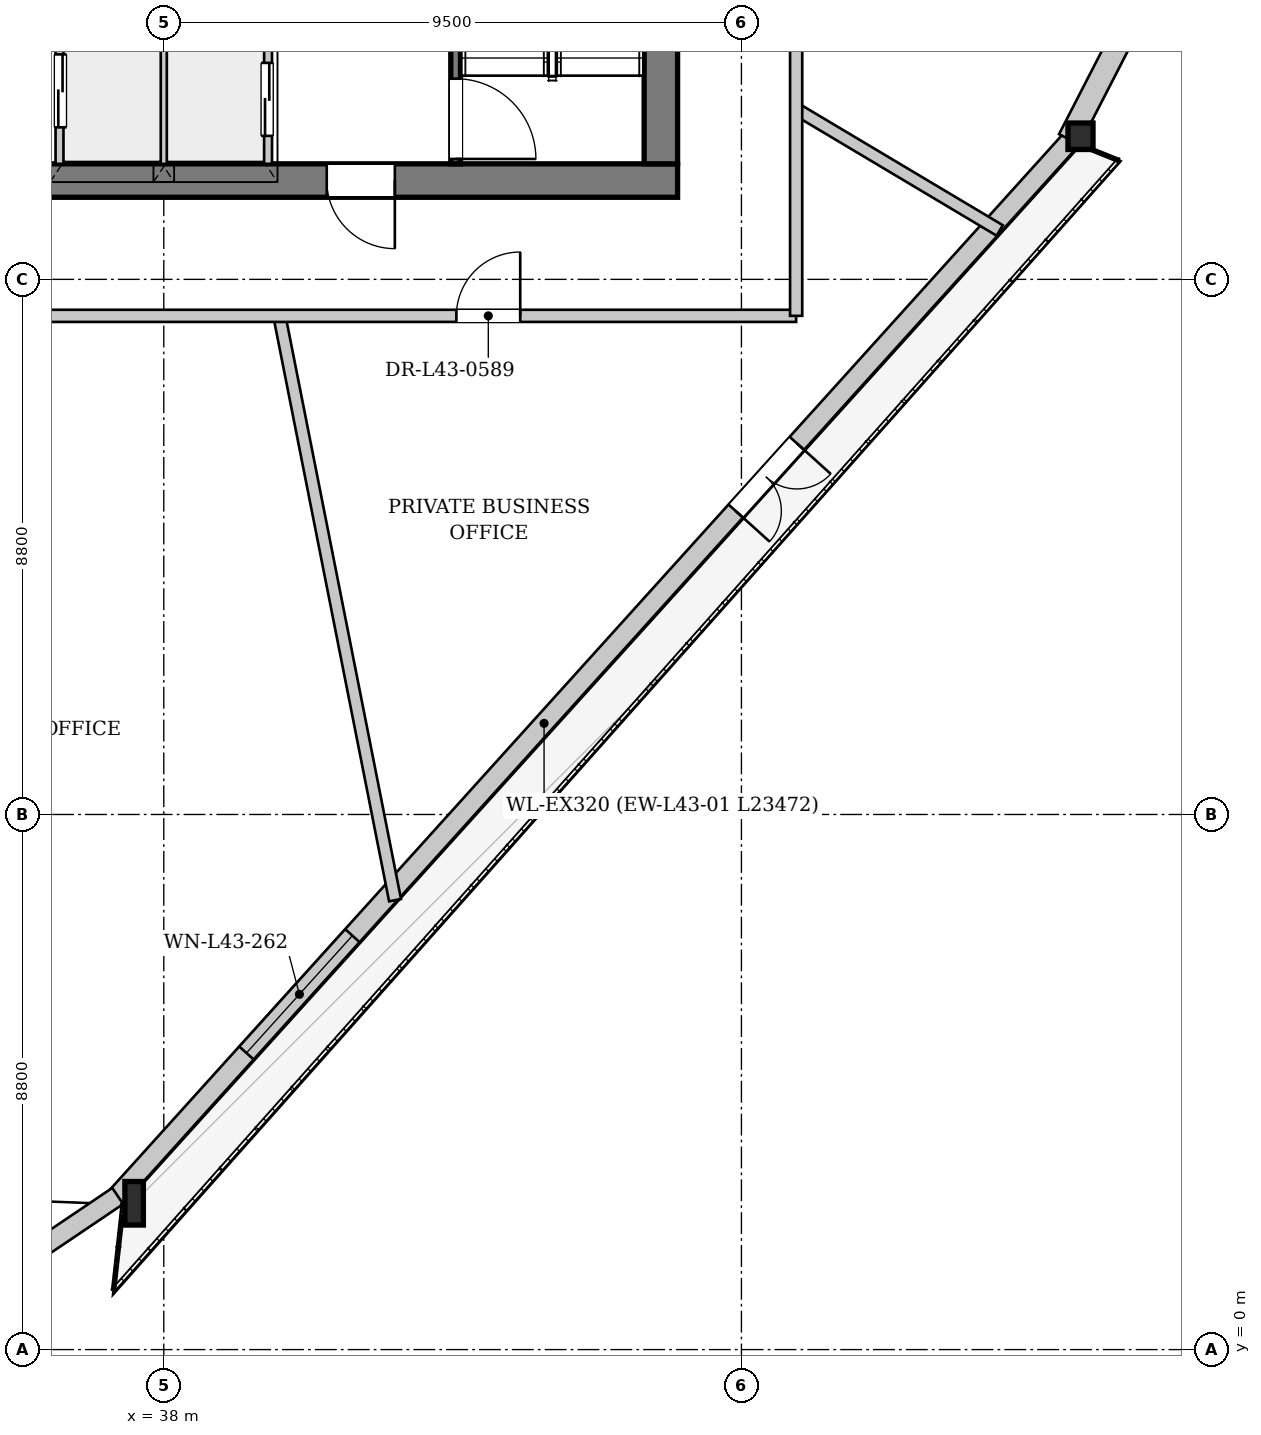
"""IFC4 building model, lengths in metres.
Left out: names, types, materials, properties, quantities, classifications, styles, units other than length and angle.
Written with IfcOpenShell. Run it as: python <this file> out.ifc"""

import sys

from ifc_helpers import new_model, si_unit, direction, frame, frame_2d, origin, origin_2d, place, context, subcontext, project, spatial, rectangle, i_section, extrude, source, transform, mapped, element, fill, save


model = new_model("IFC4")
c1 = context("Model", 3, precision=1e-05, world=origin(), true_north=direction((0.0, 1.0)))
c2 = subcontext(c1, "Body", "Model", "MODEL_VIEW")
j1 = project(units=[si_unit("LENGTHUNIT", "METRE"), si_unit("PLANEANGLEUNIT", "RADIAN")], contexts=[c1])
p1 = place(None, origin())
s1 = spatial("IfcSite", under=j1, at=p1, CompositionType="ELEMENT")
p2 = place(p1, origin())
s2 = spatial("IfcBuilding", under=s1, at=p2, CompositionType="ELEMENT")
p3 = place(p2, frame((0.0, 0.0, 164.35)))
s3 = spatial("IfcBuildingStorey", under=s2, at=p3, CompositionType="ELEMENT", Elevation=164.35)
m1 = source(origin(), c2, "Body", "SweptSolid", [
    extrude(i_section(OverallWidth=0.304, OverallDepth=0.716, WebThickness=0.021, FlangeThickness=0.04, at=origin_2d()), origin(), (0.0, 0.0, 1.0), 3.404),
])
p4 = place(p3, frame((37.332, 2.393, 0.0), z_axis=(0.105924766098, 0.007673628959, 0.994344537545), x_axis=(-0.07225478952, 0.997386206738, 0.0)))
e1 = element("IfcColumn", 1, at=p4, inside=s3, PredefinedType="COLUMN", context=c2, shape_type="MappedRepresentation", body=[
    mapped(m1, transform((0.0, 0.0, 0.0), x_axis=(1.0, 0.0, 0.0), y_axis=(0.0, 1.0, 0.0), z_axis=(0.0, 0.0, 1.0), scale=1.0)),
])
m2 = source(origin(), c2, "Body", "SweptSolid", [
    extrude(i_section(OverallWidth=0.412, OverallDepth=0.435, WebThickness=0.031, FlangeThickness=0.05, at=origin_2d()), origin(), (0.0, 0.0, 1.0), 3.396),
])
p5 = place(p3, frame((53.062, 19.814, 0.0), z_axis=(0.008697331345, 0.081941799451, 0.99659916613), x_axis=(-0.994414264622, 0.105547478964, 0.0)))
e2 = element("IfcColumn", 2, at=p5, inside=s3, PredefinedType="COLUMN", context=c2, shape_type="MappedRepresentation", body=[
    mapped(m2, transform((0.0, 0.0, 0.0), x_axis=(1.0, 0.0, 0.0), y_axis=(0.0, 1.0, 0.0), z_axis=(0.0, 0.0, 1.0), scale=1.0)),
])
p6 = place(p3, frame((52.943, 19.922, 0.0), z_axis=(0.0, 0.0, 1.0), x_axis=(-0.670163184214, -0.742213787614, 0.0)))
e3 = element("IfcWall", 3, at=p6, inside=s3, PredefinedType="SOLIDWALL", context=c2, shape_type="SweptSolid", body=[
    extrude(rectangle(XDim=23.472, YDim=0.32, at=frame_2d((11.736, 0.0))), origin(), (0.0, 0.0, 1.0), 2.722),
])
p7 = place(p6, frame((6.761, 0.0, 0.0)))
e4 = element("IfcOpeningElement", 4, at=p7, cuts=e3, PredefinedType="OPENING", context=c2, shape_type="SweptSolid", body=[
    extrude(rectangle(XDim=1.5, YDim=2.3, at=frame_2d((0.75, 1.15))), frame((0.0, 0.17, 0.0), z_axis=(0.0, -1.0, 0.0), x_axis=(1.0, 0.0, 0.0)), (0.0, 0.0, 1.0), 0.34),
])
p8 = place(p6, frame((17.669, 0.0, 0.252)))
e5 = element("IfcOpeningElement", 5, at=p8, cuts=e3, PredefinedType="OPENING", context=c2, shape_type="SweptSolid", body=[
    extrude(rectangle(XDim=2.6, YDim=2.35, at=frame_2d((1.3, 1.175))), frame((0.0, 0.17, 0.0), z_axis=(0.0, -1.0, 0.0), x_axis=(1.0, 0.0, 0.0)), (0.0, 0.0, 1.0), 0.34),
])
p9 = place(p3, frame((37.242, 2.526, 0.0), z_axis=(0.0, 0.0, 1.0), x_axis=(-0.829005606427, -0.559240292283, 0.0)))
e6 = element("IfcWall", 6, at=p9, inside=s3, PredefinedType="SOLIDWALL", context=c2, shape_type="SweptSolid", body=[
    extrude(rectangle(XDim=2.849, YDim=0.32, at=frame_2d((1.424, 0.0))), origin(), (0.0, 0.0, 1.0), 2.722),
])
p10 = place(p3, frame((63.629, 40.773, 0.0), z_axis=(0.0, 0.0, 1.0), x_axis=(-0.457435909199, -0.889242592871, 0.0)))
e7 = element("IfcWall", 7, at=p10, inside=s3, PredefinedType="SOLIDWALL", context=c2, shape_type="SweptSolid", body=[
    extrude(rectangle(XDim=23.472, YDim=0.38, at=frame_2d((11.736, 0.0))), origin(), (0.0, 0.0, 1.0), 2.722),
])
p11 = place(p10, frame((7.072, 0.0, 0.352)))
e8 = element("IfcOpeningElement", 8, at=p11, cuts=e7, PredefinedType="OPENING", context=c2, shape_type="SweptSolid", body=[
    extrude(rectangle(XDim=2.2, YDim=2.25, at=frame_2d((1.1, 1.125))), frame((0.0, 0.2, 0.0), z_axis=(0.0, -1.0, 0.0), x_axis=(1.0, 0.0, 0.0)), (0.0, 0.0, 1.0), 0.4),
])
p12 = place(p10, frame((15.8, 0.0, 0.352)))
e9 = element("IfcOpeningElement", 9, at=p12, cuts=e7, PredefinedType="OPENING", context=c2, shape_type="SweptSolid", body=[
    extrude(rectangle(XDim=2.2, YDim=2.25, at=frame_2d((1.1, 1.125))), frame((0.0, 0.2, 0.0), z_axis=(0.0, -1.0, 0.0), x_axis=(1.0, 0.0, 0.0)), (0.0, 0.0, 1.0), 0.4),
])
p13 = place(p3, frame((46.45, 19.225, 0.0), z_axis=(0.0, 0.0, 1.0), x_axis=(-1.0, 0.0, 0.0)))
e10 = element("IfcWall", 10, at=p13, inside=s3, PredefinedType="SHEAR", context=c2, shape_type="SweptSolid", body=[
    extrude(rectangle(XDim=16.9, YDim=0.55, at=frame_2d((8.45, 0.0))), origin(), (0.0, 0.0, 1.0), 3.33),
])
p14 = place(p13, frame((4.65, 0.0, 0.0)))
e11 = element("IfcOpeningElement", 11, at=p14, cuts=e10, PredefinedType="OPENING", context=c2, shape_type="SweptSolid", body=[
    extrude(rectangle(XDim=1.12, YDim=2.25, at=frame_2d((0.56, 1.125))), frame((0.0, 0.285, 0.0), z_axis=(0.0, -1.0, 0.0), x_axis=(1.0, 0.0, 0.0)), (0.0, 0.0, 1.0), 0.57),
])
p15 = place(p13, frame((11.15, 0.0, 0.0)))
e12 = element("IfcOpeningElement", 12, at=p15, cuts=e10, PredefinedType="OPENING", context=c2, shape_type="SweptSolid", body=[
    extrude(rectangle(XDim=1.12, YDim=2.25, at=frame_2d((0.56, 1.125))), frame((0.0, 0.285, 0.0), z_axis=(0.0, -1.0, 0.0), x_axis=(1.0, 0.0, 0.0)), (0.0, 0.0, 1.0), 0.57),
])
p16 = place(p3, frame((46.175, 33.7, 0.0), z_axis=(0.0, 0.0, 1.0), x_axis=(0.0, -1.0, 0.0)))
e13 = element("IfcWall", 13, at=p16, inside=s3, PredefinedType="SHEAR", context=c2, shape_type="SweptSolid", body=[
    extrude(rectangle(XDim=14.2, YDim=0.55, at=frame_2d((7.1, 0.0))), origin(), (0.0, 0.0, 1.0), 3.33),
])
p17 = place(p16, frame((5.18, 0.0, 0.0)))
e14 = element("IfcOpeningElement", 14, at=p17, cuts=e13, PredefinedType="OPENING", context=c2, shape_type="SweptSolid", body=[
    extrude(rectangle(XDim=1.6, YDim=2.2, at=frame_2d((0.8, 1.1))), frame((0.0, 0.285, 0.0), z_axis=(0.0, -1.0, 0.0), x_axis=(1.0, 0.0, 0.0)), (0.0, 0.0, 1.0), 0.57),
])
p18 = place(p16, frame((2.05, 0.0, 0.0)))
e15 = element("IfcOpeningElement", 15, at=p18, cuts=e13, PredefinedType="OPENING", context=c2, shape_type="SweptSolid", body=[
    extrude(rectangle(XDim=0.95, YDim=2.1, at=frame_2d((0.475, 1.05))), frame((0.0, 0.285, 0.0), z_axis=(0.0, -1.0, 0.0), x_axis=(1.0, 0.0, 0.0)), (0.0, 0.0, 1.0), 0.57),
])
p19 = place(p3, frame((42.8, 26.96, 0.0), z_axis=(0.0, 0.0, 1.0), x_axis=(0.0, -1.0, 0.0)))
e16 = element("IfcWall", 16, at=p19, inside=s3, PredefinedType="PARTITIONING", context=c2, shape_type="SweptSolid", body=[
    extrude(rectangle(XDim=7.46, YDim=0.16, at=frame_2d((3.73, 0.0))), origin(), (0.0, 0.0, 1.0), 3.33),
])
p20 = place(p19, frame((6.06, 0.0, 0.0)))
e17 = element("IfcOpeningElement", 17, at=p20, cuts=e16, PredefinedType="OPENING", context=c2, shape_type="SweptSolid", body=[
    extrude(rectangle(XDim=1.32, YDim=2.2, at=frame_2d((0.66, 1.1))), frame((0.0, 0.09, 0.0), z_axis=(0.0, -1.0, 0.0), x_axis=(1.0, 0.0, 0.0)), (0.0, 0.0, 1.0), 0.18),
])
p21 = place(p3, frame((36.3, 19.5, 0.0), z_axis=(0.0, 0.0, 1.0), x_axis=(0.0, 1.0, 0.0)))
e18 = element("IfcWall", 18, at=p21, inside=s3, PredefinedType="PARTITIONING", context=c2, shape_type="SweptSolid", body=[
    extrude(rectangle(XDim=4.78, YDim=0.16, at=frame_2d((2.39, 0.0))), origin(), (0.0, 0.0, 1.0), 3.33),
])
p22 = place(p21, frame((0.6, 0.0, 0.0)))
e19 = element("IfcOpeningElement", 19, at=p22, cuts=e18, PredefinedType="OPENING", context=c2, shape_type="SweptSolid", body=[
    extrude(rectangle(XDim=1.2, YDim=2.2, at=frame_2d((0.6, 1.1))), frame((0.0, 0.09, 0.0), z_axis=(0.0, -1.0, 0.0), x_axis=(1.0, 0.0, 0.0)), (0.0, 0.0, 1.0), 0.18),
])
p23 = place(p21, frame((2.65, 0.0, 0.0)))
e20 = element("IfcOpeningElement", 20, at=p23, cuts=e18, PredefinedType="OPENING", context=c2, shape_type="SweptSolid", body=[
    extrude(rectangle(XDim=0.95, YDim=2.1, at=frame_2d((0.475, 1.05))), frame((0.0, 0.09, 0.0), z_axis=(0.0, -1.0, 0.0), x_axis=(1.0, 0.0, 0.0)), (0.0, 0.0, 1.0), 0.18),
])
p24 = place(p3, frame((39.7, 24.28, 0.0), z_axis=(0.0, 0.0, 1.0), x_axis=(0.0, -1.0, 0.0)))
e21 = element("IfcWall", 21, at=p24, inside=s3, PredefinedType="PARTITIONING", context=c2, shape_type="SweptSolid", body=[
    extrude(rectangle(XDim=4.78, YDim=0.16, at=frame_2d((2.39, 0.0))), origin(), (0.0, 0.0, 1.0), 3.33),
])
p25 = place(p24, frame((3.12, 0.0, 0.0)))
e22 = element("IfcOpeningElement", 22, at=p25, cuts=e21, PredefinedType="OPENING", context=c2, shape_type="SweptSolid", body=[
    extrude(rectangle(XDim=1.2, YDim=2.2, at=frame_2d((0.6, 1.1))), frame((0.0, 0.09, 0.0), z_axis=(0.0, -1.0, 0.0), x_axis=(1.0, 0.0, 0.0)), (0.0, 0.0, 1.0), 0.18),
])
p26 = place(p3, frame((38.0, 19.5, 0.0), z_axis=(0.0, 0.0, 1.0), x_axis=(0.0, 1.0, 0.0)))
e23 = element("IfcWall", 23, at=p26, inside=s3, PredefinedType="PARTITIONING", context=c2, shape_type="SweptSolid", body=[
    extrude(rectangle(XDim=2.46, YDim=0.125, at=frame_2d((1.23, 0.0))), origin(), (0.0, 0.0, 1.0), 3.33),
])
p27 = place(p3, frame((39.901, 17.0, 0.0), z_axis=(0.0, 0.0, 1.0), x_axis=(0.194222602979, -0.98095748149, 0.0)))
e24 = element("IfcWall", 24, at=p27, inside=s3, PredefinedType="PARTITIONING", context=c2, shape_type="SweptSolid", body=[
    extrude(rectangle(XDim=9.796, YDim=0.2, at=frame_2d((4.898, 0.0))), origin(), (0.0, 0.0, 1.0), 3.33),
])
p28 = place(p3, frame((48.4, 20.4, 0.0), z_axis=(0.0, 0.0, 1.0), x_axis=(0.858964986341, -0.512034327209, 0.0)))
e25 = element("IfcWall", 25, at=p28, inside=s3, PredefinedType="PARTITIONING", context=c2, shape_type="SweptSolid", body=[
    extrude(rectangle(XDim=3.898, YDim=0.2, at=frame_2d((1.949, 0.0))), origin(), (0.0, 0.0, 1.0), 3.33),
])
p29 = place(p3, frame((27.6, 17.0, 0.0), z_axis=(0.0, 0.0, 1.0), x_axis=(1.0, 0.0, 0.0)))
e26 = element("IfcWall", 26, at=p29, inside=s3, PredefinedType="PARTITIONING", context=c2, shape_type="SweptSolid", body=[
    extrude(rectangle(XDim=20.8, YDim=0.2, at=frame_2d((10.4, 0.0))), origin(), (0.0, 0.0, 1.0), 3.33),
])
p30 = place(p29, frame((6.363, 0.0, 0.0)))
e27 = element("IfcOpeningElement", 27, at=p30, cuts=e26, PredefinedType="OPENING", context=c2, shape_type="SweptSolid", body=[
    extrude(rectangle(XDim=1.05, YDim=2.2, at=frame_2d((0.525, 1.1))), frame((0.0, 0.11, 0.0), z_axis=(0.0, -1.0, 0.0), x_axis=(1.0, 0.0, 0.0)), (0.0, 0.0, 1.0), 0.22),
])
p31 = place(p29, frame((15.212, 0.0, 0.0)))
e28 = element("IfcOpeningElement", 28, at=p31, cuts=e26, PredefinedType="OPENING", context=c2, shape_type="SweptSolid", body=[
    extrude(rectangle(XDim=1.05, YDim=2.2, at=frame_2d((0.525, 1.1))), frame((0.0, 0.11, 0.0), z_axis=(0.0, -1.0, 0.0), x_axis=(1.0, 0.0, 0.0)), (0.0, 0.0, 1.0), 0.22),
])
p32 = place(p3, frame((48.4, 17.0, 0.0), z_axis=(0.0, 0.0, 1.0), x_axis=(0.0, 1.0, 0.0)))
e29 = element("IfcWall", 29, at=p32, inside=s3, PredefinedType="PARTITIONING", context=c2, shape_type="SweptSolid", body=[
    extrude(rectangle(XDim=19.2, YDim=0.2, at=frame_2d((9.6, 0.0))), origin(), (0.0, 0.0, 1.0), 3.33),
])
p33 = place(p32, frame((7.736, 0.0, 0.0)))
e30 = element("IfcOpeningElement", 30, at=p33, cuts=e29, PredefinedType="OPENING", context=c2, shape_type="SweptSolid", body=[
    extrude(rectangle(XDim=1.05, YDim=2.2, at=frame_2d((0.525, 1.1))), frame((0.0, 0.11, 0.0), z_axis=(0.0, -1.0, 0.0), x_axis=(1.0, 0.0, 0.0)), (0.0, 0.0, 1.0), 0.22),
])
m3 = source(origin(), c2, "Body", "SweptSolid", [
    extrude(rectangle(XDim=1.5, YDim=2.3, at=frame_2d((0.75, 1.15))), frame((0.0, 0.025, 0.0), z_axis=(0.0, -1.0, 0.0), x_axis=(1.0, 0.0, 0.0)), (0.0, 0.0, 1.0), 0.05),
])
p34 = place(p7, origin())
e31 = element("IfcDoor", 31, at=p34, inside=s3, OperationType="DOUBLE_DOOR_SINGLE_SWING", PredefinedType="DOOR", context=c2, shape_type="MappedRepresentation", body=[
    mapped(m3, transform((0.0, 0.0, 0.0), x_axis=(1.0, 0.0, 0.0), y_axis=(0.0, 1.0, 0.0), z_axis=(0.0, 0.0, 1.0), scale=1.0)),
])
fill(e4, e31)
m4 = source(origin(), c2, "Body", "SweptSolid", [
    extrude(rectangle(XDim=2.6, YDim=2.35, at=frame_2d((1.3, 1.175))), frame((0.0, 0.03, 0.0), z_axis=(0.0, -1.0, 0.0), x_axis=(1.0, 0.0, 0.0)), (0.0, 0.0, 1.0), 0.06),
])
p35 = place(p8, origin())
e32 = element("IfcWindow", 32, at=p35, inside=s3, PartitioningType="SINGLE_PANEL", PredefinedType="WINDOW", context=c2, shape_type="MappedRepresentation", body=[
    mapped(m4, transform((0.0, 0.0, 0.0), x_axis=(1.0, 0.0, 0.0), y_axis=(0.0, 1.0, 0.0), z_axis=(0.0, 0.0, 1.0), scale=1.0)),
])
fill(e5, e32)
m5 = source(origin(), c2, "Body", "SweptSolid", [
    extrude(rectangle(XDim=1.12, YDim=2.25, at=frame_2d((0.56, 1.125))), frame((0.0, 0.025, 0.0), z_axis=(0.0, -1.0, 0.0), x_axis=(1.0, 0.0, 0.0)), (0.0, 0.0, 1.0), 0.05),
])
p36 = place(p14, origin())
e33 = element("IfcDoor", 33, at=p36, inside=s3, OperationType="SINGLE_SWING_LEFT", PredefinedType="DOOR", context=c2, shape_type="MappedRepresentation", body=[
    mapped(m5, transform((0.0, 0.0, 0.0), x_axis=(1.0, 0.0, 0.0), y_axis=(0.0, 1.0, 0.0), z_axis=(0.0, 0.0, 1.0), scale=1.0)),
])
fill(e11, e33)
m6 = source(origin(), c2, "Body", "SweptSolid", [
    extrude(rectangle(XDim=1.32, YDim=2.2, at=frame_2d((0.66, 1.1))), frame((0.0, 0.025, 0.0), z_axis=(0.0, -1.0, 0.0), x_axis=(1.0, 0.0, 0.0)), (0.0, 0.0, 1.0), 0.05),
])
p37 = place(p20, origin())
e34 = element("IfcDoor", 34, at=p37, inside=s3, OperationType="SINGLE_SWING_RIGHT", PredefinedType="DOOR", context=c2, shape_type="MappedRepresentation", body=[
    mapped(m6, transform((0.0, 0.0, 0.0), x_axis=(1.0, 0.0, 0.0), y_axis=(0.0, 1.0, 0.0), z_axis=(0.0, 0.0, 1.0), scale=1.0)),
])
fill(e17, e34)
m7 = source(origin(), c2, "Body", "SweptSolid", [
    extrude(rectangle(XDim=1.2, YDim=2.2, at=frame_2d((0.6, 1.1))), frame((0.0, 0.025, 0.0), z_axis=(0.0, -1.0, 0.0), x_axis=(1.0, 0.0, 0.0)), (0.0, 0.0, 1.0), 0.05),
])
p38 = place(p22, origin())
e35 = element("IfcDoor", 35, at=p38, inside=s3, OperationType="DOUBLE_DOOR_SLIDING", PredefinedType="DOOR", context=c2, shape_type="MappedRepresentation", body=[
    mapped(m7, transform((0.0, 0.0, 0.0), x_axis=(1.0, 0.0, 0.0), y_axis=(0.0, 1.0, 0.0), z_axis=(0.0, 0.0, 1.0), scale=1.0)),
])
fill(e19, e35)
p39 = place(p25, origin())
e36 = element("IfcDoor", 36, at=p39, inside=s3, OperationType="DOUBLE_DOOR_SLIDING", PredefinedType="DOOR", context=c2, shape_type="MappedRepresentation", body=[
    mapped(m7, transform((0.0, 0.0, 0.0), x_axis=(1.0, 0.0, 0.0), y_axis=(0.0, 1.0, 0.0), z_axis=(0.0, 0.0, 1.0), scale=1.0)),
])
fill(e22, e36)
m8 = source(origin(), c2, "Body", "SweptSolid", [
    extrude(rectangle(XDim=1.05, YDim=2.2, at=frame_2d((0.525, 1.1))), frame((0.0, 0.025, 0.0), z_axis=(0.0, -1.0, 0.0), x_axis=(1.0, 0.0, 0.0)), (0.0, 0.0, 1.0), 0.05),
])
p40 = place(p31, origin())
e37 = element("IfcDoor", 37, at=p40, inside=s3, OperationType="SINGLE_SWING_RIGHT", PredefinedType="DOOR", context=c2, shape_type="MappedRepresentation", body=[
    mapped(m8, transform((0.0, 0.0, 0.0), x_axis=(1.0, 0.0, 0.0), y_axis=(0.0, 1.0, 0.0), z_axis=(0.0, 0.0, 1.0), scale=1.0)),
])
fill(e28, e37)
save(model, sys.argv[1])
